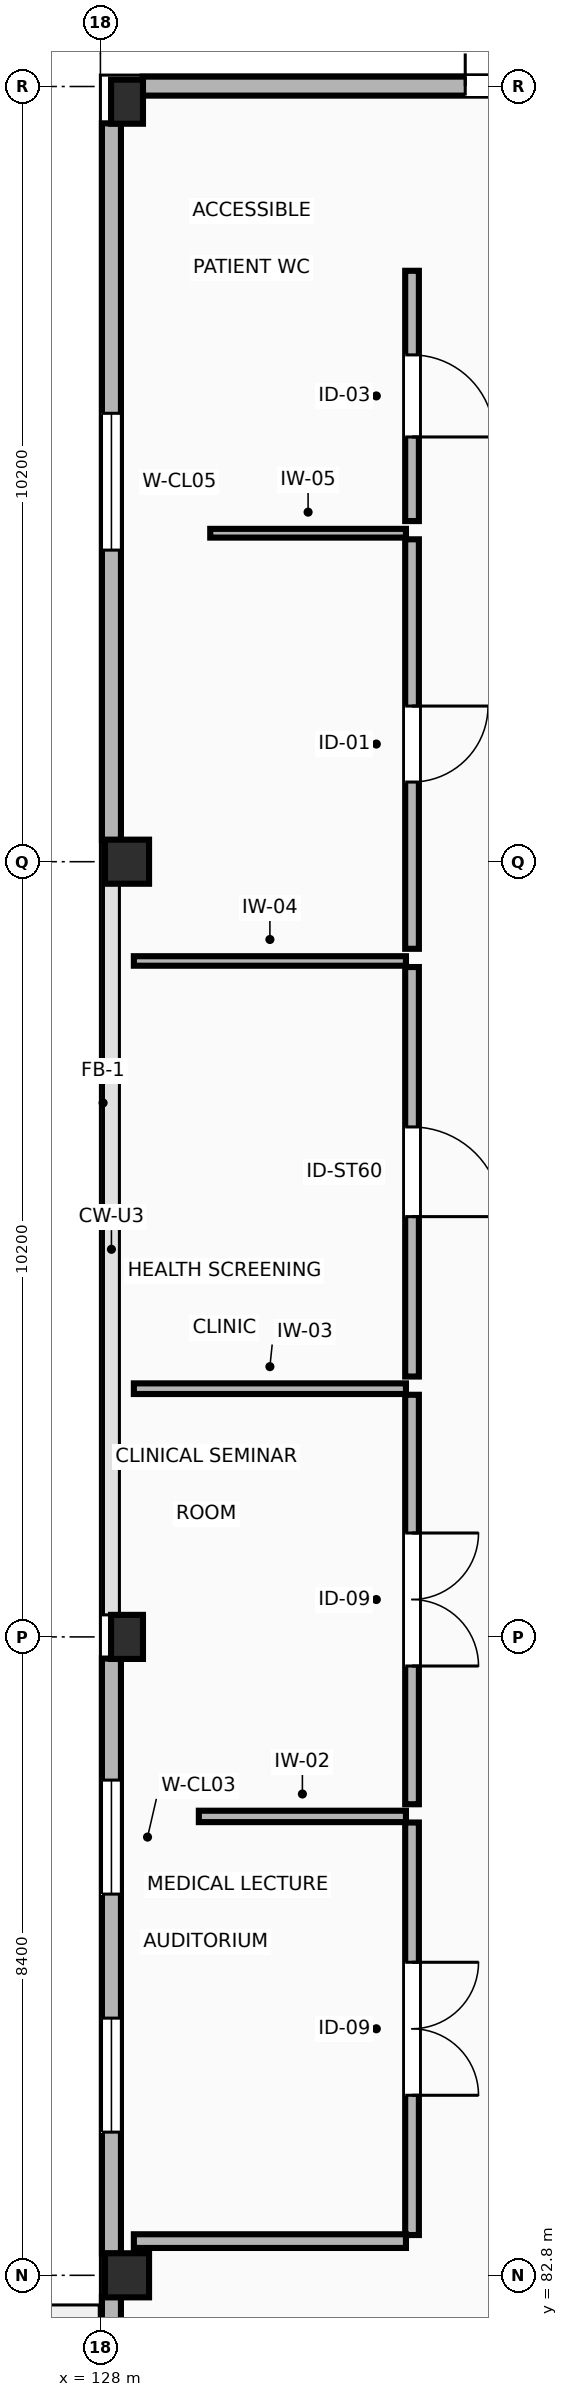
"""IFC4 building model, lengths in metres.
Left out: names, types, materials, properties, quantities, classifications, styles, units other than length and angle.
Written with IfcOpenShell. Run it as: python <this file> out.ifc"""

import sys

from ifc_helpers import new_model, si_unit, direction, frame, frame_2d, origin, origin_2d, place, context, subcontext, project, spatial, rectangle, extrude, element, fill, save


model = new_model("IFC4")
c1 = context("Model", 3, precision=1e-05, world=origin(), true_north=direction((0.0, 1.0)))
c2 = subcontext(c1, "Body", "Model", "MODEL_VIEW")
j1 = project(units=[si_unit("LENGTHUNIT", "METRE"), si_unit("PLANEANGLEUNIT", "RADIAN")], contexts=[c1])
p1 = place(None, origin())
s1 = spatial("IfcSite", under=j1, at=p1, CompositionType="ELEMENT")
p2 = place(p1, origin())
s2 = spatial("IfcBuilding", under=s1, at=p2, CompositionType="ELEMENT")
p3 = place(p2, origin())
s3 = spatial("IfcBuildingStorey", under=s2, at=p3, CompositionType="ELEMENT", Elevation=0.0)
p4 = place(p3, frame((128.35, 82.8, -1.75), z_axis=(0.0, 0.0, 1.0), x_axis=(1.0, 0.0, 0.0)))
e1 = element("IfcColumn", 1, at=p4, inside=s3, PredefinedType="COLUMN", context=c2, shape_type="SweptSolid", body=[
    extrude(rectangle(XDim=0.58, YDim=0.58, at=origin_2d()), origin(), (0.0, 0.0, 1.0), 7.15),
])
p5 = place(p3, frame((128.35, 91.2, -1.75), z_axis=(0.0, 0.0, 1.0), x_axis=(1.0, 0.0, 0.0)))
e2 = element("IfcColumn", 2, at=p5, inside=s3, PredefinedType="COLUMN", context=c2, shape_type="SweptSolid", body=[
    extrude(rectangle(XDim=0.42, YDim=0.58, at=origin_2d()), origin(), (0.0, 0.0, 1.0), 7.15),
])
p6 = place(p3, frame((128.35, 101.4, -1.75), z_axis=(0.0, 0.0, 1.0), x_axis=(1.0, 0.0, 0.0)))
e3 = element("IfcColumn", 3, at=p6, inside=s3, PredefinedType="COLUMN", context=c2, shape_type="SweptSolid", body=[
    extrude(rectangle(XDim=0.58, YDim=0.58, at=origin_2d()), origin(), (0.0, 0.0, 1.0), 7.15),
])
p7 = place(p3, frame((128.35, 111.4, -1.75), z_axis=(0.0, 0.0, 1.0), x_axis=(1.0, 0.0, 0.0)))
e4 = element("IfcColumn", 4, at=p7, inside=s3, PredefinedType="COLUMN", context=c2, shape_type="SweptSolid", body=[
    extrude(rectangle(XDim=0.42, YDim=0.58, at=origin_2d()), origin(), (0.0, 0.0, 1.0), 7.15),
])
p8 = place(p3, frame((136.89, 111.605, 0.0), z_axis=(0.0, 0.0, 1.0), x_axis=(-1.0, 0.0, 0.0)))
e5 = element("IfcWall", 5, at=p8, inside=s3, PredefinedType="STANDARD", context=c2, shape_type="SweptSolid", body=[
    extrude(rectangle(XDim=8.335, YDim=0.25, at=frame_2d((4.167, 0.0))), origin(), (0.0, 0.0, 1.0), 4.42),
])
p9 = place(p8, frame((2.09, 0.0, 0.0)))
e6 = element("IfcOpeningElement", 6, at=p9, cuts=e5, PredefinedType="OPENING", context=c2, shape_type="SweptSolid", body=[
    extrude(rectangle(XDim=2.0, YDim=2.4, at=frame_2d((1.0, 1.2))), frame((0.0, 0.135, 0.0), z_axis=(0.0, -1.0, 0.0), x_axis=(1.0, 0.0, 0.0)), (0.0, 0.0, 1.0), 0.27),
])
p10 = place(p3, frame((128.145, 111.115, 0.0), z_axis=(0.0, 0.0, 1.0), x_axis=(0.0, -1.0, 0.0)))
e7 = element("IfcWall", 7, at=p10, inside=s3, PredefinedType="STANDARD", context=c2, shape_type="SweptSolid", body=[
    extrude(rectangle(XDim=9.43, YDim=0.25, at=frame_2d((4.715, 0.0))), origin(), (0.0, 0.0, 1.0), 4.47),
])
p11 = place(p10, frame((3.815, 0.0, 0.95)))
e8 = element("IfcOpeningElement", 8, at=p11, cuts=e7, PredefinedType="OPENING", context=c2, shape_type="SweptSolid", body=[
    extrude(rectangle(XDim=1.8, YDim=1.5, at=frame_2d((0.9, 0.75))), frame((0.0, 0.135, 0.0), z_axis=(0.0, -1.0, 0.0), x_axis=(1.0, 0.0, 0.0)), (0.0, 0.0, 1.0), 0.27),
])
p12 = place(p3, frame((128.145, 90.915, 0.0), z_axis=(0.0, 0.0, 1.0), x_axis=(0.0, -1.0, 0.0)))
e9 = element("IfcWall", 9, at=p12, inside=s3, PredefinedType="STANDARD", context=c2, shape_type="SweptSolid", body=[
    extrude(rectangle(XDim=7.83, YDim=0.25, at=frame_2d((3.915, 0.0))), origin(), (0.0, 0.0, 1.0), 4.545),
])
p13 = place(p12, frame((1.599, 0.0, 0.95)))
e10 = element("IfcOpeningElement", 10, at=p13, cuts=e9, PredefinedType="OPENING", context=c2, shape_type="SweptSolid", body=[
    extrude(rectangle(XDim=1.5, YDim=1.65, at=frame_2d((0.75, 0.825))), frame((0.0, 0.135, 0.0), z_axis=(0.0, -1.0, 0.0), x_axis=(1.0, 0.0, 0.0)), (0.0, 0.0, 1.0), 0.27),
])
p14 = place(p12, frame((4.731, 0.0, 0.95)))
e11 = element("IfcOpeningElement", 11, at=p14, cuts=e9, PredefinedType="OPENING", context=c2, shape_type="SweptSolid", body=[
    extrude(rectangle(XDim=1.5, YDim=1.65, at=frame_2d((0.75, 0.825))), frame((0.0, 0.135, 0.0), z_axis=(0.0, -1.0, 0.0), x_axis=(1.0, 0.0, 0.0)), (0.0, 0.0, 1.0), 0.27),
])
p15 = place(p3, frame((128.145, 82.515, 0.0), z_axis=(0.0, 0.0, 1.0), x_axis=(0.0, -1.0, 0.0)))
e12 = element("IfcWall", 12, at=p15, inside=s3, PredefinedType="STANDARD", context=c2, shape_type="SweptSolid", body=[
    extrude(rectangle(XDim=9.03, YDim=0.25, at=frame_2d((4.515, 0.0))), origin(), (0.0, 0.0, 1.0), 4.445),
])
p16 = place(p15, frame((0.655, 0.0, 0.0)))
e13 = element("IfcOpeningElement", 13, at=p16, cuts=e12, PredefinedType="OPENING", context=c2, shape_type="SweptSolid", body=[
    extrude(rectangle(XDim=1.8, YDim=2.3, at=frame_2d((0.9, 1.15))), frame((0.0, 0.135, 0.0), z_axis=(0.0, -1.0, 0.0), x_axis=(1.0, 0.0, 0.0)), (0.0, 0.0, 1.0), 0.27),
])
p17 = place(p3, frame((129.295, 88.838, 0.0), z_axis=(0.0, 0.0, 1.0), x_axis=(1.0, 0.0, 0.0)))
e14 = element("IfcWall", 14, at=p17, inside=s3, PredefinedType="PARTITIONING", context=c2, shape_type="SweptSolid", body=[
    extrude(rectangle(XDim=2.725, YDim=0.15, at=frame_2d((1.363, 0.0))), origin(), (0.0, 0.0, 1.0), 5.1),
])
p18 = place(p3, frame((132.1, 88.758, 0.0), z_axis=(0.0, 0.0, 1.0), x_axis=(0.0, -1.0, 0.0)))
e15 = element("IfcWall", 15, at=p18, inside=s3, PredefinedType="PARTITIONING", context=c2, shape_type="SweptSolid", body=[
    extrude(rectangle(XDim=5.428, YDim=0.18, at=frame_2d((2.714, 0.0))), origin(), (0.0, 0.0, 1.0), 5.1),
])
p19 = place(p18, frame((1.839, 0.0, 0.0)))
e16 = element("IfcOpeningElement", 16, at=p19, cuts=e15, PredefinedType="OPENING", context=c2, shape_type="SweptSolid", body=[
    extrude(rectangle(XDim=1.75, YDim=2.35, at=frame_2d((0.875, 1.175))), frame((0.0, 0.1, 0.0), z_axis=(0.0, -1.0, 0.0), x_axis=(1.0, 0.0, 0.0)), (0.0, 0.0, 1.0), 0.2),
])
p20 = place(p3, frame((132.02, 83.25, 0.0), z_axis=(0.0, 0.0, 1.0), x_axis=(-1.0, 0.0, 0.0)))
e17 = element("IfcWall", 17, at=p20, inside=s3, PredefinedType="PARTITIONING", context=c2, shape_type="SweptSolid", body=[
    extrude(rectangle(XDim=3.58, YDim=0.18, at=frame_2d((1.79, 0.0))), origin(), (0.0, 0.0, 1.0), 4.435),
])
p21 = place(p3, frame((128.44, 94.466, 0.0), z_axis=(0.0, 0.0, 1.0), x_axis=(1.0, 0.0, 0.0)))
e18 = element("IfcWall", 18, at=p21, inside=s3, PredefinedType="PARTITIONING", context=c2, shape_type="SweptSolid", body=[
    extrude(rectangle(XDim=3.58, YDim=0.14, at=frame_2d((1.79, 0.0))), origin(), (0.0, 0.0, 1.0), 5.1),
])
p22 = place(p3, frame((132.1, 94.386, 0.0), z_axis=(0.0, 0.0, 1.0), x_axis=(0.0, -1.0, 0.0)))
e19 = element("IfcWall", 19, at=p22, inside=s3, PredefinedType="PARTITIONING", context=c2, shape_type="SweptSolid", body=[
    extrude(rectangle(XDim=5.388, YDim=0.18, at=frame_2d((2.694, 0.0))), origin(), (0.0, 0.0, 1.0), 5.1),
])
p23 = place(p22, frame((1.819, 0.0, 0.0)))
e20 = element("IfcOpeningElement", 20, at=p23, cuts=e19, PredefinedType="OPENING", context=c2, shape_type="SweptSolid", body=[
    extrude(rectangle(XDim=1.75, YDim=2.35, at=frame_2d((0.875, 1.175))), frame((0.0, 0.1, 0.0), z_axis=(0.0, -1.0, 0.0), x_axis=(1.0, 0.0, 0.0)), (0.0, 0.0, 1.0), 0.2),
])
p24 = place(p3, frame((128.44, 100.094, 0.0), z_axis=(0.0, 0.0, 1.0), x_axis=(1.0, 0.0, 0.0)))
e21 = element("IfcWall", 21, at=p24, inside=s3, PredefinedType="PARTITIONING", context=c2, shape_type="SweptSolid", body=[
    extrude(rectangle(XDim=3.58, YDim=0.125, at=frame_2d((1.79, 0.0))), origin(), (0.0, 0.0, 1.0), 5.1),
])
p25 = place(p3, frame((132.1, 100.014, 0.0), z_axis=(0.0, 0.0, 1.0), x_axis=(0.0, -1.0, 0.0)))
e22 = element("IfcWall", 22, at=p25, inside=s3, PredefinedType="PARTITIONING", context=c2, shape_type="SweptSolid", body=[
    extrude(rectangle(XDim=5.388, YDim=0.18, at=frame_2d((2.694, 0.0))), origin(), (0.0, 0.0, 1.0), 5.1),
])
p26 = place(p25, frame((2.104, 0.0, 0.0)))
e23 = element("IfcOpeningElement", 23, at=p26, cuts=e22, PredefinedType="OPENING", context=c2, shape_type="SweptSolid", body=[
    extrude(rectangle(XDim=1.18, YDim=2.18, at=frame_2d((0.59, 1.09))), frame((0.0, 0.1, 0.0), z_axis=(0.0, -1.0, 0.0), x_axis=(1.0, 0.0, 0.0)), (0.0, 0.0, 1.0), 0.2),
])
p27 = place(p3, frame((129.445, 105.722, 0.0), z_axis=(0.0, 0.0, 1.0), x_axis=(1.0, 0.0, 0.0)))
e24 = element("IfcWall", 24, at=p27, inside=s3, PredefinedType="PARTITIONING", context=c2, shape_type="SweptSolid", body=[
    extrude(rectangle(XDim=2.575, YDim=0.115, at=frame_2d((1.288, 0.0))), origin(), (0.0, 0.0, 1.0), 5.1),
])
p28 = place(p3, frame((132.1, 105.642, 0.0), z_axis=(0.0, 0.0, 1.0), x_axis=(0.0, -1.0, 0.0)))
e25 = element("IfcWall", 25, at=p28, inside=s3, PredefinedType="PARTITIONING", context=c2, shape_type="SweptSolid", body=[
    extrude(rectangle(XDim=5.388, YDim=0.18, at=frame_2d((2.694, 0.0))), origin(), (0.0, 0.0, 1.0), 5.1),
])
p29 = place(p28, frame((2.194, 0.0, 0.0)))
e26 = element("IfcOpeningElement", 26, at=p29, cuts=e25, PredefinedType="OPENING", context=c2, shape_type="SweptSolid", body=[
    extrude(rectangle(XDim=1.0, YDim=2.15, at=frame_2d((0.5, 1.075))), frame((0.0, 0.1, 0.0), z_axis=(0.0, -1.0, 0.0), x_axis=(1.0, 0.0, 0.0)), (0.0, 0.0, 1.0), 0.2),
])
p30 = place(p3, frame((132.1, 109.175, 0.0), z_axis=(0.0, 0.0, 1.0), x_axis=(0.0, -1.0, 0.0)))
e27 = element("IfcWall", 27, at=p30, inside=s3, PredefinedType="PARTITIONING", context=c2, shape_type="SweptSolid", body=[
    extrude(rectangle(XDim=3.293, YDim=0.18, at=frame_2d((1.646, 0.0))), origin(), (0.0, 0.0, 1.0), 5.1),
])
p31 = place(p30, frame((1.106, 0.0, 0.0)))
e28 = element("IfcOpeningElement", 28, at=p31, cuts=e27, PredefinedType="OPENING", context=c2, shape_type="SweptSolid", body=[
    extrude(rectangle(XDim=1.08, YDim=2.2, at=frame_2d((0.54, 1.1))), frame((0.0, 0.1, 0.0), z_axis=(0.0, -1.0, 0.0), x_axis=(1.0, 0.0, 0.0)), (0.0, 0.0, 1.0), 0.2),
])
p32 = place(p9, frame((2.0, 0.0, 0.0), z_axis=(0.0, 0.0, 1.0), x_axis=(-1.0, 0.0, 0.0)))
e29 = element("IfcDoor", 29, at=p32, inside=s3, OperationType="DOUBLE_DOOR_SINGLE_SWING", PredefinedType="DOOR", context=c2, shape_type="SweptSolid", body=[
    extrude(rectangle(XDim=2.0, YDim=2.4, at=frame_2d((1.0, 1.2))), frame((0.0, 0.025, 0.0), z_axis=(0.0, -1.0, 0.0), x_axis=(1.0, 0.0, 0.0)), (0.0, 0.0, 1.0), 0.05),
])
fill(e6, e29)
p33 = place(p11, origin())
e30 = element("IfcWindow", 30, at=p33, inside=s3, PartitioningType="SINGLE_PANEL", PredefinedType="WINDOW", context=c2, shape_type="SweptSolid", body=[
    extrude(rectangle(XDim=1.8, YDim=1.5, at=frame_2d((0.9, 0.75))), frame((0.0, 0.03, 0.0), z_axis=(0.0, -1.0, 0.0), x_axis=(1.0, 0.0, 0.0)), (0.0, 0.0, 1.0), 0.06),
])
fill(e8, e30)
p34 = place(p13, origin())
e31 = element("IfcWindow", 31, at=p34, inside=s3, PartitioningType="SINGLE_PANEL", PredefinedType="WINDOW", context=c2, shape_type="SweptSolid", body=[
    extrude(rectangle(XDim=1.5, YDim=1.65, at=frame_2d((0.75, 0.825))), frame((0.0, 0.03, 0.0), z_axis=(0.0, -1.0, 0.0), x_axis=(1.0, 0.0, 0.0)), (0.0, 0.0, 1.0), 0.06),
])
fill(e10, e31)
p35 = place(p14, origin())
e32 = element("IfcWindow", 32, at=p35, inside=s3, PartitioningType="SINGLE_PANEL", PredefinedType="WINDOW", context=c2, shape_type="SweptSolid", body=[
    extrude(rectangle(XDim=1.5, YDim=1.65, at=frame_2d((0.75, 0.825))), frame((0.0, 0.03, 0.0), z_axis=(0.0, -1.0, 0.0), x_axis=(1.0, 0.0, 0.0)), (0.0, 0.0, 1.0), 0.06),
])
fill(e11, e32)
p36 = place(p19, origin())
e33 = element("IfcDoor", 33, at=p36, inside=s3, OperationType="DOUBLE_DOOR_SINGLE_SWING", PredefinedType="DOOR", context=c2, shape_type="SweptSolid", body=[
    extrude(rectangle(XDim=1.75, YDim=2.35, at=frame_2d((0.875, 1.175))), frame((0.0, 0.025, 0.0), z_axis=(0.0, -1.0, 0.0), x_axis=(1.0, 0.0, 0.0)), (0.0, 0.0, 1.0), 0.05),
])
fill(e16, e33)
p37 = place(p23, origin())
e34 = element("IfcDoor", 34, at=p37, inside=s3, OperationType="DOUBLE_DOOR_SINGLE_SWING", PredefinedType="DOOR", context=c2, shape_type="SweptSolid", body=[
    extrude(rectangle(XDim=1.75, YDim=2.35, at=frame_2d((0.875, 1.175))), frame((0.0, 0.025, 0.0), z_axis=(0.0, -1.0, 0.0), x_axis=(1.0, 0.0, 0.0)), (0.0, 0.0, 1.0), 0.05),
])
fill(e20, e34)
p38 = place(p26, origin())
e35 = element("IfcDoor", 35, at=p38, inside=s3, OperationType="SINGLE_SWING_RIGHT", PredefinedType="DOOR", context=c2, shape_type="SweptSolid", body=[
    extrude(rectangle(XDim=1.18, YDim=2.18, at=frame_2d((0.59, 1.09))), frame((0.0, 0.025, 0.0), z_axis=(0.0, -1.0, 0.0), x_axis=(1.0, 0.0, 0.0)), (0.0, 0.0, 1.0), 0.05),
])
fill(e23, e35)
p39 = place(p29, origin())
e36 = element("IfcDoor", 36, at=p39, inside=s3, OperationType="SINGLE_SWING_LEFT", PredefinedType="DOOR", context=c2, shape_type="SweptSolid", body=[
    extrude(rectangle(XDim=1.0, YDim=2.15, at=frame_2d((0.5, 1.075))), frame((0.0, 0.025, 0.0), z_axis=(0.0, -1.0, 0.0), x_axis=(1.0, 0.0, 0.0)), (0.0, 0.0, 1.0), 0.05),
])
fill(e26, e36)
p40 = place(p31, origin())
e37 = element("IfcDoor", 37, at=p40, inside=s3, OperationType="SINGLE_SWING_RIGHT", PredefinedType="DOOR", context=c2, shape_type="SweptSolid", body=[
    extrude(rectangle(XDim=1.08, YDim=2.2, at=frame_2d((0.54, 1.1))), frame((0.0, 0.025, 0.0), z_axis=(0.0, -1.0, 0.0), x_axis=(1.0, 0.0, 0.0)), (0.0, 0.0, 1.0), 0.05),
])
fill(e28, e37)
save(model, sys.argv[1])
